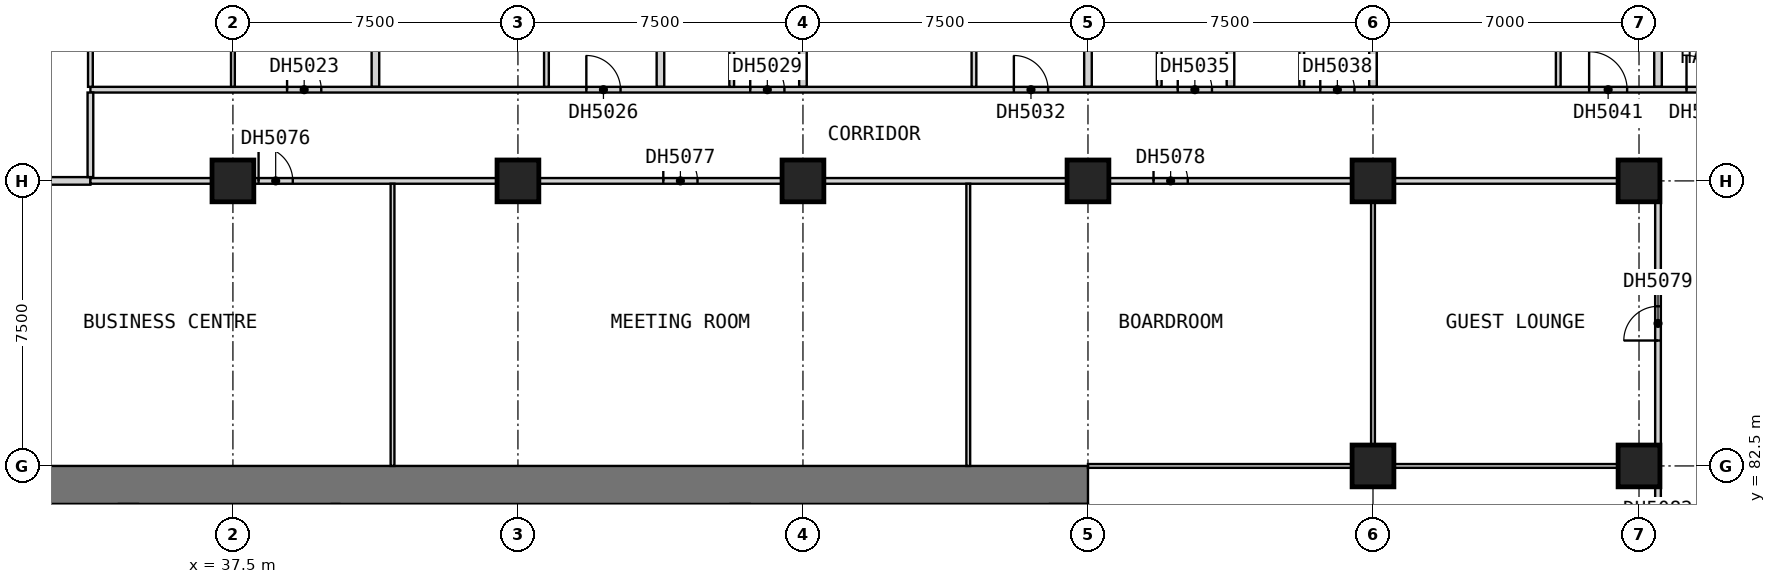
"""IFC4 building model, lengths in metres.
Left out: names, types, materials, properties, quantities, classifications, styles, units other than length and angle.
Written with IfcOpenShell. Run it as: python <this file> out.ifc"""

import sys

from ifc_helpers import new_model, si_unit, direction, frame, frame_2d, origin, origin_2d, place, context, subcontext, project, spatial, rectangle, extrude, element, fill, save


model = new_model("IFC4")
c1 = context("Model", 3, precision=1e-05, world=origin(), true_north=direction((0.0, 1.0)))
c2 = subcontext(c1, "Body", "Model", "MODEL_VIEW")
j1 = project(units=[si_unit("LENGTHUNIT", "METRE"), si_unit("PLANEANGLEUNIT", "RADIAN")], contexts=[c1])
p1 = place(None, origin())
s1 = spatial("IfcSite", under=j1, at=p1, CompositionType="ELEMENT")
p2 = place(p1, origin())
s2 = spatial("IfcBuilding", under=s1, at=p2, CompositionType="ELEMENT")
p3 = place(p2, frame((0.0, 0.0, 79.1)))
s3 = spatial("IfcBuildingStorey", under=s2, at=p3, CompositionType="ELEMENT", Elevation=79.1)
for number, where, z_axis, x_axis in (
    (1, (37.5, 90.0, 0.0), (0.0, 0.0, 1.0), (1.0, 0.0, 0.0)),
    (2, (45.0, 90.0, 0.0), (0.0, 0.0, 1.0), (1.0, 0.0, 0.0)),
    (3, (52.5, 90.0, 0.0), (0.0, 0.0, 1.0), (1.0, 0.0, 0.0)),
    (4, (60.0, 90.0, 0.0), (0.0, 0.0, 1.0), (1.0, 0.0, 0.0)),
    (5, (67.5, 82.5, 0.0), (0.0, 0.0, 1.0), (1.0, 0.0, 0.0)),
    (6, (67.5, 90.0, 0.0), (0.0, 0.0, 1.0), (1.0, 0.0, 0.0)),
    (7, (74.5, 82.5, 0.0), (0.0, 0.0, 1.0), (1.0, 0.0, 0.0)),
    (8, (74.5, 90.0, 0.0), (0.0, 0.0, 1.0), (1.0, 0.0, 0.0)),
):
    element("IfcColumn", number, at=place(p3, frame(where, z_axis=z_axis, x_axis=x_axis)), inside=s3, PredefinedType="COLUMN", context=c2, shape_type="SweptSolid", body=[
        extrude(rectangle(XDim=1.1, YDim=1.1, at=origin_2d()), origin(), (0.0, 0.0, 1.0), 3.6),
    ])
p4 = place(p3, frame((30.0, 82.0, 0.0), z_axis=(0.0, 0.0, 1.0), x_axis=(1.0, 0.0, 0.0)))
e9 = element("IfcWall", 9, at=p4, inside=s3, PredefinedType="SHEAR", context=c2, shape_type="SweptSolid", body=[
    extrude(rectangle(XDim=30.0, YDim=1.0, at=frame_2d((15.0, 0.0))), origin(), (0.0, 0.0, 1.0), 3.6),
])
for number, where, z_axis, x_axis in (
    (10, (34.75, 78.3, 0.0), (0.0, 0.0, 1.0), (0.0, 1.0, 0.0)),
    (11, (50.85, 78.3, 0.0), (0.0, 0.0, 1.0), (0.0, 1.0, 0.0)),
):
    element("IfcWall", number, at=place(p3, frame(where, z_axis=z_axis, x_axis=x_axis)), inside=s3, PredefinedType="SHEAR", context=c2, shape_type="SweptSolid", body=[
        extrude(rectangle(XDim=3.2, YDim=0.5, at=frame_2d((1.6, 0.0))), origin(), (0.0, 0.0, 1.0), 3.6),
    ])
p5 = place(p3, frame((30.0, 90.0, 0.0), z_axis=(0.0, 0.0, 1.0), x_axis=(1.0, 0.0, 0.0)))
e12 = element("IfcWall", 12, at=p5, inside=s3, PredefinedType="PARTITIONING", context=c2, shape_type="SweptSolid", body=[
    extrude(rectangle(XDim=3.75, YDim=0.2, at=frame_2d((1.875, 0.0))), origin(), (0.0, 0.0, 1.0), 3.35),
])
for number, where, z_axis, x_axis in (
    (13, (41.25, 92.475, 0.0), (0.0, 0.0, 1.0), (0.0, 1.0, 0.0)),
    (14, (48.75, 92.475, 0.0), (0.0, 0.0, 1.0), (0.0, 1.0, 0.0)),
):
    element("IfcWall", number, at=place(p3, frame(where, z_axis=z_axis, x_axis=x_axis)), inside=s3, PredefinedType="PARTITIONING", context=c2, shape_type="SweptSolid", body=[
        extrude(rectangle(XDim=11.715, YDim=0.2, at=frame_2d((5.857, 0.0))), origin(), (0.0, 0.0, 1.0), 3.35),
    ])
for number, where, z_axis, x_axis in (
    (15, (52.5, 92.475, 0.0), (0.0, 0.0, 1.0), (0.0, 1.0, 0.0)),
    (16, (60.0, 92.475, 0.0), (0.0, 0.0, 1.0), (0.0, 1.0, 0.0)),
):
    element("IfcWall", number, at=place(p3, frame(where, z_axis=z_axis, x_axis=x_axis)), inside=s3, PredefinedType="PARTITIONING", context=c2, shape_type="SweptSolid", body=[
        extrude(rectangle(XDim=12.525, YDim=0.2, at=frame_2d((6.262, 0.0))), origin(), (0.0, 0.0, 1.0), 3.35),
    ])
p6 = place(p3, frame((63.75, 92.475, 0.0), z_axis=(0.0, 0.0, 1.0), x_axis=(0.0, 1.0, 0.0)))
e17 = element("IfcWall", 17, at=p6, inside=s3, PredefinedType="PARTITIONING", context=c2, shape_type="SweptSolid", body=[
    extrude(rectangle(XDim=11.715, YDim=0.2, at=frame_2d((5.857, 0.0))), origin(), (0.0, 0.0, 1.0), 3.35),
])
p7 = place(p3, frame((67.5, 92.475, 0.0), z_axis=(0.0, 0.0, 1.0), x_axis=(0.0, 1.0, 0.0)))
e18 = element("IfcWall", 18, at=p7, inside=s3, PredefinedType="PARTITIONING", context=c2, shape_type="SweptSolid", body=[
    extrude(rectangle(XDim=12.525, YDim=0.2, at=frame_2d((6.262, 0.0))), origin(), (0.0, 0.0, 1.0), 3.35),
])
p8 = place(p3, frame((75.0, 92.475, 0.0), z_axis=(0.0, 0.0, 1.0), x_axis=(0.0, 1.0, 0.0)))
e19 = element("IfcWall", 19, at=p8, inside=s3, PredefinedType="PARTITIONING", context=c2, shape_type="SweptSolid", body=[
    extrude(rectangle(XDim=11.715, YDim=0.2, at=frame_2d((5.857, 0.0))), origin(), (0.0, 0.0, 1.0), 3.35),
])
p9 = place(p3, frame((33.75, 90.0, 0.0), z_axis=(0.0, 0.0, 1.0), x_axis=(1.0, 0.0, 0.0)))
e20 = element("IfcWall", 20, at=p9, inside=s3, PredefinedType="PARTITIONING", context=c2, shape_type="SweptSolid", body=[
    extrude(rectangle(XDim=41.25, YDim=0.15, at=frame_2d((20.625, 0.0))), origin(), (0.0, 0.0, 1.0), 3.35),
])
p10 = place(p9, frame((4.425, 0.0, 0.0)))
e21 = element("IfcOpeningElement", 21, at=p10, cuts=e20, PredefinedType="OPENING", context=c2, shape_type="SweptSolid", body=[
    extrude(rectangle(XDim=0.9, YDim=2.1, at=frame_2d((0.45, 1.05))), frame((0.0, 0.085, 0.0), z_axis=(0.0, -1.0, 0.0), x_axis=(1.0, 0.0, 0.0)), (0.0, 0.0, 1.0), 0.17),
])
p11 = place(p9, frame((15.075, 0.0, 0.0)))
e22 = element("IfcOpeningElement", 22, at=p11, cuts=e20, PredefinedType="OPENING", context=c2, shape_type="SweptSolid", body=[
    extrude(rectangle(XDim=0.9, YDim=2.1, at=frame_2d((0.45, 1.05))), frame((0.0, 0.085, 0.0), z_axis=(0.0, -1.0, 0.0), x_axis=(1.0, 0.0, 0.0)), (0.0, 0.0, 1.0), 0.17),
])
p12 = place(p9, frame((27.975, 0.0, 0.0)))
e23 = element("IfcOpeningElement", 23, at=p12, cuts=e20, PredefinedType="OPENING", context=c2, shape_type="SweptSolid", body=[
    extrude(rectangle(XDim=0.9, YDim=2.1, at=frame_2d((0.45, 1.05))), frame((0.0, 0.085, 0.0), z_axis=(0.0, -1.0, 0.0), x_axis=(1.0, 0.0, 0.0)), (0.0, 0.0, 1.0), 0.17),
])
p13 = place(p3, frame((33.75, 92.4, 0.0), z_axis=(0.0, 0.0, 1.0), x_axis=(1.0, 0.0, 0.0)))
e24 = element("IfcWall", 24, at=p13, inside=s3, PredefinedType="PARTITIONING", context=c2, shape_type="SweptSolid", body=[
    extrude(rectangle(XDim=43.65, YDim=0.15, at=frame_2d((21.825, 0.0))), origin(), (0.0, 0.0, 1.0), 3.35),
])
p14 = place(p13, frame((5.175, 0.0, 0.0)))
e25 = element("IfcOpeningElement", 25, at=p14, cuts=e24, PredefinedType="OPENING", context=c2, shape_type="SweptSolid", body=[
    extrude(rectangle(XDim=0.9, YDim=2.1, at=frame_2d((0.45, 1.05))), frame((0.0, 0.085, 0.0), z_axis=(0.0, -1.0, 0.0), x_axis=(1.0, 0.0, 0.0)), (0.0, 0.0, 1.0), 0.17),
])
p15 = place(p13, frame((13.05, 0.0, 0.0)))
e26 = element("IfcOpeningElement", 26, at=p15, cuts=e24, PredefinedType="OPENING", context=c2, shape_type="SweptSolid", body=[
    extrude(rectangle(XDim=0.9, YDim=2.1, at=frame_2d((0.45, 1.05))), frame((0.0, 0.085, 0.0), z_axis=(0.0, -1.0, 0.0), x_axis=(1.0, 0.0, 0.0)), (0.0, 0.0, 1.0), 0.17),
])
p16 = place(p13, frame((17.363, 0.0, 0.0)))
e27 = element("IfcOpeningElement", 27, at=p16, cuts=e24, PredefinedType="OPENING", context=c2, shape_type="SweptSolid", body=[
    extrude(rectangle(XDim=0.9, YDim=2.1, at=frame_2d((0.45, 1.05))), frame((0.0, 0.085, 0.0), z_axis=(0.0, -1.0, 0.0), x_axis=(1.0, 0.0, 0.0)), (0.0, 0.0, 1.0), 0.17),
])
p17 = place(p13, frame((24.3, 0.0, 0.0)))
e28 = element("IfcOpeningElement", 28, at=p17, cuts=e24, PredefinedType="OPENING", context=c2, shape_type="SweptSolid", body=[
    extrude(rectangle(XDim=0.9, YDim=2.1, at=frame_2d((0.45, 1.05))), frame((0.0, 0.085, 0.0), z_axis=(0.0, -1.0, 0.0), x_axis=(1.0, 0.0, 0.0)), (0.0, 0.0, 1.0), 0.17),
])
p18 = place(p13, frame((28.613, 0.0, 0.0)))
e29 = element("IfcOpeningElement", 29, at=p18, cuts=e24, PredefinedType="OPENING", context=c2, shape_type="SweptSolid", body=[
    extrude(rectangle(XDim=0.9, YDim=2.1, at=frame_2d((0.45, 1.05))), frame((0.0, 0.085, 0.0), z_axis=(0.0, -1.0, 0.0), x_axis=(1.0, 0.0, 0.0)), (0.0, 0.0, 1.0), 0.17),
])
p19 = place(p13, frame((32.363, 0.0, 0.0)))
e30 = element("IfcOpeningElement", 30, at=p19, cuts=e24, PredefinedType="OPENING", context=c2, shape_type="SweptSolid", body=[
    extrude(rectangle(XDim=0.9, YDim=2.1, at=frame_2d((0.45, 1.05))), frame((0.0, 0.085, 0.0), z_axis=(0.0, -1.0, 0.0), x_axis=(1.0, 0.0, 0.0)), (0.0, 0.0, 1.0), 0.17),
])
p20 = place(p13, frame((39.438, 0.0, 0.0)))
e31 = element("IfcOpeningElement", 31, at=p20, cuts=e24, PredefinedType="OPENING", context=c2, shape_type="SweptSolid", body=[
    extrude(rectangle(XDim=1.0, YDim=2.1, at=frame_2d((0.5, 1.05))), frame((0.0, 0.085, 0.0), z_axis=(0.0, -1.0, 0.0), x_axis=(1.0, 0.0, 0.0)), (0.0, 0.0, 1.0), 0.17),
])
p21 = place(p13, frame((42.0, 0.0, 0.0)))
e32 = element("IfcOpeningElement", 32, at=p21, cuts=e24, PredefinedType="OPENING", context=c2, shape_type="SweptSolid", body=[
    extrude(rectangle(XDim=0.9, YDim=2.1, at=frame_2d((0.45, 1.05))), frame((0.0, 0.085, 0.0), z_axis=(0.0, -1.0, 0.0), x_axis=(1.0, 0.0, 0.0)), (0.0, 0.0, 1.0), 0.17),
])
p22 = place(p3, frame((33.75, 90.1, 0.0), z_axis=(0.0, 0.0, 1.0), x_axis=(0.0, 1.0, 0.0)))
e33 = element("IfcWall", 33, at=p22, inside=s3, PredefinedType="PARTITIONING", context=c2, shape_type="SweptSolid", body=[
    extrude(rectangle(XDim=2.225, YDim=0.15, at=frame_2d((1.112, 0.0))), origin(), (0.0, 0.0, 1.0), 3.35),
])
p23 = place(p3, frame((75.0, 78.075, 0.0), z_axis=(0.0, 0.0, 1.0), x_axis=(0.0, 1.0, 0.0)))
e34 = element("IfcWall", 34, at=p23, inside=s3, PredefinedType="PARTITIONING", context=c2, shape_type="SweptSolid", body=[
    extrude(rectangle(XDim=11.85, YDim=0.15, at=frame_2d((5.925, 0.0))), origin(), (0.0, 0.0, 1.0), 3.35),
])
p24 = place(p23, frame((7.725, 0.0, 0.0)))
e35 = element("IfcOpeningElement", 35, at=p24, cuts=e34, PredefinedType="OPENING", context=c2, shape_type="SweptSolid", body=[
    extrude(rectangle(XDim=0.9, YDim=2.1, at=frame_2d((0.45, 1.05))), frame((0.0, 0.085, 0.0), z_axis=(0.0, -1.0, 0.0), x_axis=(1.0, 0.0, 0.0)), (0.0, 0.0, 1.0), 0.17),
])
p25 = place(p23, frame((1.725, 0.0, 0.0)))
e36 = element("IfcOpeningElement", 36, at=p25, cuts=e34, PredefinedType="OPENING", context=c2, shape_type="SweptSolid", body=[
    extrude(rectangle(XDim=0.9, YDim=2.1, at=frame_2d((0.45, 1.05))), frame((0.0, 0.085, 0.0), z_axis=(0.0, -1.0, 0.0), x_axis=(1.0, 0.0, 0.0)), (0.0, 0.0, 1.0), 0.17),
])
p26 = place(p3, frame((60.0, 82.5, 0.0), z_axis=(0.0, 0.0, 1.0), x_axis=(1.0, 0.0, 0.0)))
e37 = element("IfcWall", 37, at=p26, inside=s3, PredefinedType="PARTITIONING", context=c2, shape_type="SweptSolid", body=[
    extrude(rectangle(XDim=14.925, YDim=0.1, at=frame_2d((7.462, 0.0))), origin(), (0.0, 0.0, 1.0), 3.35),
])
p27 = place(p3, frame((37.5, 92.475, 0.0), z_axis=(0.0, 0.0, 1.0), x_axis=(0.0, 1.0, 0.0)))
e38 = element("IfcWall", 38, at=p27, inside=s3, PredefinedType="PARTITIONING", context=c2, shape_type="SweptSolid", body=[
    extrude(rectangle(XDim=4.225, YDim=0.1, at=frame_2d((2.112, 0.0))), origin(), (0.0, 0.0, 1.0), 3.35),
])
p28 = place(p27, frame((1.65, 0.0, 0.0)))
e39 = element("IfcOpeningElement", 39, at=p28, cuts=e38, PredefinedType="OPENING", context=c2, shape_type="SweptSolid", body=[
    extrude(rectangle(XDim=0.9, YDim=2.1, at=frame_2d((0.45, 1.05))), frame((0.0, 0.06, 0.0), z_axis=(0.0, -1.0, 0.0), x_axis=(1.0, 0.0, 0.0)), (0.0, 0.0, 1.0), 0.12),
])
for number, where, z_axis, x_axis in (
    (40, (41.7, 82.5, 0.0), (0.0, 0.0, 1.0), (0.0, 1.0, 0.0)),
    (41, (56.85, 82.5, 0.0), (0.0, 0.0, 1.0), (0.0, 1.0, 0.0)),
):
    element("IfcWall", number, at=place(p3, frame(where, z_axis=z_axis, x_axis=x_axis)), inside=s3, PredefinedType="PARTITIONING", context=c2, shape_type="SweptSolid", body=[
        extrude(rectangle(XDim=7.425, YDim=0.1, at=frame_2d((3.712, 0.0))), origin(), (0.0, 0.0, 1.0), 3.35),
    ])
p29 = place(p3, frame((67.5, 82.55, 0.0), z_axis=(0.0, 0.0, 1.0), x_axis=(0.0, 1.0, 0.0)))
e42 = element("IfcWall", 42, at=p29, inside=s3, PredefinedType="PARTITIONING", context=c2, shape_type="SweptSolid", body=[
    extrude(rectangle(XDim=7.375, YDim=0.1, at=frame_2d((3.688, 0.0))), origin(), (0.0, 0.0, 1.0), 3.35),
])
for number, where, z_axis, x_axis in (
    (43, (33.75, 92.475, 0.0), (0.0, 0.0, 1.0), (0.0, 1.0, 0.0)),
    (44, (45.75, 92.475, 0.0), (0.0, 0.0, 1.0), (0.0, 1.0, 0.0)),
    (45, (50.625, 92.475, 0.0), (0.0, 0.0, 1.0), (0.0, 1.0, 0.0)),
    (46, (57.0, 92.475, 0.0), (0.0, 0.0, 1.0), (0.0, 1.0, 0.0)),
    (47, (61.875, 92.475, 0.0), (0.0, 0.0, 1.0), (0.0, 1.0, 0.0)),
    (48, (65.625, 92.475, 0.0), (0.0, 0.0, 1.0), (0.0, 1.0, 0.0)),
    (49, (72.375, 92.475, 0.0), (0.0, 0.0, 1.0), (0.0, 1.0, 0.0)),
):
    element("IfcWall", number, at=place(p3, frame(where, z_axis=z_axis, x_axis=x_axis)), inside=s3, PredefinedType="PARTITIONING", context=c2, shape_type="SweptSolid", body=[
        extrude(rectangle(XDim=4.212, YDim=0.125, at=frame_2d((2.106, 0.0))), origin(), (0.0, 0.0, 1.0), 3.35),
    ])
p30 = place(p14, origin())
e50 = element("IfcDoor", 50, at=p30, inside=s3, OperationType="SINGLE_SWING_LEFT", PredefinedType="DOOR", context=c2, shape_type="SweptSolid", body=[
    extrude(rectangle(XDim=0.9, YDim=2.1, at=frame_2d((0.45, 1.05))), frame((0.0, 0.025, 0.0), z_axis=(0.0, -1.0, 0.0), x_axis=(1.0, 0.0, 0.0)), (0.0, 0.0, 1.0), 0.05),
])
fill(e25, e50)
p31 = place(p15, origin())
e51 = element("IfcDoor", 51, at=p31, inside=s3, OperationType="SINGLE_SWING_LEFT", PredefinedType="DOOR", context=c2, shape_type="SweptSolid", body=[
    extrude(rectangle(XDim=0.9, YDim=2.1, at=frame_2d((0.45, 1.05))), frame((0.0, 0.025, 0.0), z_axis=(0.0, -1.0, 0.0), x_axis=(1.0, 0.0, 0.0)), (0.0, 0.0, 1.0), 0.05),
])
fill(e26, e51)
p32 = place(p16, origin())
e52 = element("IfcDoor", 52, at=p32, inside=s3, OperationType="SINGLE_SWING_LEFT", PredefinedType="DOOR", context=c2, shape_type="SweptSolid", body=[
    extrude(rectangle(XDim=0.9, YDim=2.1, at=frame_2d((0.45, 1.05))), frame((0.0, 0.025, 0.0), z_axis=(0.0, -1.0, 0.0), x_axis=(1.0, 0.0, 0.0)), (0.0, 0.0, 1.0), 0.05),
])
fill(e27, e52)
p33 = place(p17, origin())
e53 = element("IfcDoor", 53, at=p33, inside=s3, OperationType="SINGLE_SWING_LEFT", PredefinedType="DOOR", context=c2, shape_type="SweptSolid", body=[
    extrude(rectangle(XDim=0.9, YDim=2.1, at=frame_2d((0.45, 1.05))), frame((0.0, 0.025, 0.0), z_axis=(0.0, -1.0, 0.0), x_axis=(1.0, 0.0, 0.0)), (0.0, 0.0, 1.0), 0.05),
])
fill(e28, e53)
p34 = place(p18, origin())
e54 = element("IfcDoor", 54, at=p34, inside=s3, OperationType="SINGLE_SWING_LEFT", PredefinedType="DOOR", context=c2, shape_type="SweptSolid", body=[
    extrude(rectangle(XDim=0.9, YDim=2.1, at=frame_2d((0.45, 1.05))), frame((0.0, 0.025, 0.0), z_axis=(0.0, -1.0, 0.0), x_axis=(1.0, 0.0, 0.0)), (0.0, 0.0, 1.0), 0.05),
])
fill(e29, e54)
p35 = place(p19, origin())
e55 = element("IfcDoor", 55, at=p35, inside=s3, OperationType="SINGLE_SWING_LEFT", PredefinedType="DOOR", context=c2, shape_type="SweptSolid", body=[
    extrude(rectangle(XDim=0.9, YDim=2.1, at=frame_2d((0.45, 1.05))), frame((0.0, 0.025, 0.0), z_axis=(0.0, -1.0, 0.0), x_axis=(1.0, 0.0, 0.0)), (0.0, 0.0, 1.0), 0.05),
])
fill(e30, e55)
p36 = place(p20, origin())
e56 = element("IfcDoor", 56, at=p36, inside=s3, OperationType="SINGLE_SWING_LEFT", PredefinedType="DOOR", context=c2, shape_type="SweptSolid", body=[
    extrude(rectangle(XDim=1.0, YDim=2.1, at=frame_2d((0.5, 1.05))), frame((0.0, 0.025, 0.0), z_axis=(0.0, -1.0, 0.0), x_axis=(1.0, 0.0, 0.0)), (0.0, 0.0, 1.0), 0.05),
])
fill(e31, e56)
p37 = place(p21, origin())
e57 = element("IfcDoor", 57, at=p37, inside=s3, OperationType="SINGLE_SWING_RIGHT", PredefinedType="DOOR", context=c2, shape_type="SweptSolid", body=[
    extrude(rectangle(XDim=0.9, YDim=2.1, at=frame_2d((0.45, 1.05))), frame((0.0, 0.025, 0.0), z_axis=(0.0, -1.0, 0.0), x_axis=(1.0, 0.0, 0.0)), (0.0, 0.0, 1.0), 0.05),
])
fill(e32, e57)
p38 = place(p10, origin())
e58 = element("IfcDoor", 58, at=p38, inside=s3, OperationType="SINGLE_SWING_LEFT", PredefinedType="DOOR", context=c2, shape_type="SweptSolid", body=[
    extrude(rectangle(XDim=0.9, YDim=2.1, at=frame_2d((0.45, 1.05))), frame((0.0, 0.025, 0.0), z_axis=(0.0, -1.0, 0.0), x_axis=(1.0, 0.0, 0.0)), (0.0, 0.0, 1.0), 0.05),
])
fill(e21, e58)
p39 = place(p11, origin())
e59 = element("IfcDoor", 59, at=p39, inside=s3, OperationType="SINGLE_SWING_RIGHT", PredefinedType="DOOR", context=c2, shape_type="SweptSolid", body=[
    extrude(rectangle(XDim=0.9, YDim=2.1, at=frame_2d((0.45, 1.05))), frame((0.0, 0.025, 0.0), z_axis=(0.0, -1.0, 0.0), x_axis=(1.0, 0.0, 0.0)), (0.0, 0.0, 1.0), 0.05),
])
fill(e22, e59)
p40 = place(p12, origin())
e60 = element("IfcDoor", 60, at=p40, inside=s3, OperationType="SINGLE_SWING_RIGHT", PredefinedType="DOOR", context=c2, shape_type="SweptSolid", body=[
    extrude(rectangle(XDim=0.9, YDim=2.1, at=frame_2d((0.45, 1.05))), frame((0.0, 0.025, 0.0), z_axis=(0.0, -1.0, 0.0), x_axis=(1.0, 0.0, 0.0)), (0.0, 0.0, 1.0), 0.05),
])
fill(e23, e60)
p41 = place(p24, origin())
e61 = element("IfcDoor", 61, at=p41, inside=s3, OperationType="SINGLE_SWING_LEFT", PredefinedType="DOOR", context=c2, shape_type="SweptSolid", body=[
    extrude(rectangle(XDim=0.9, YDim=2.1, at=frame_2d((0.45, 1.05))), frame((0.0, 0.025, 0.0), z_axis=(0.0, -1.0, 0.0), x_axis=(1.0, 0.0, 0.0)), (0.0, 0.0, 1.0), 0.05),
])
fill(e35, e61)
save(model, sys.argv[1])
